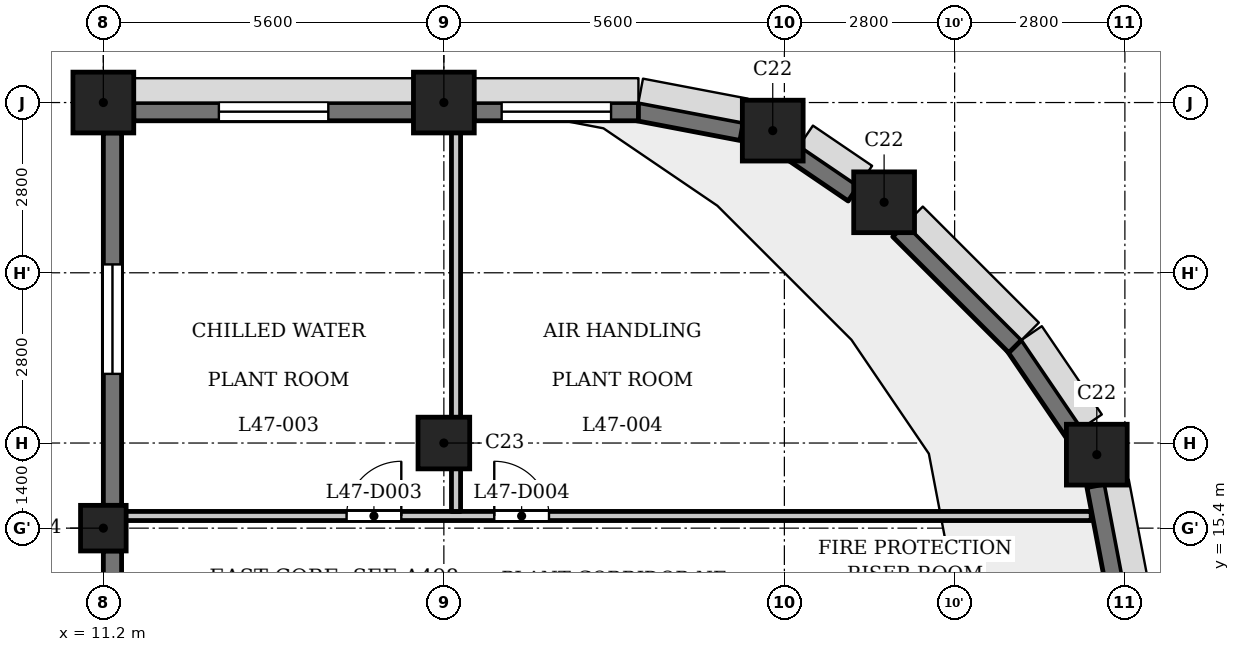
"""IFC4 building model, lengths in metres.
Left out: names, types, materials, properties, quantities, classifications, styles, units other than length and angle.
Written with IfcOpenShell. Run it as: python <this file> out.ifc"""

import sys

from ifc_helpers import new_model, si_unit, direction, frame, frame_2d, origin, origin_2d, place, context, subcontext, project, spatial, rectangle, extrude, element, fill, save


model = new_model("IFC4")
c1 = context("Model", 3, precision=1e-05, world=origin(), true_north=direction((0.0, 1.0)))
c2 = subcontext(c1, "Body", "Model", "MODEL_VIEW")
j1 = project(units=[si_unit("LENGTHUNIT", "METRE"), si_unit("PLANEANGLEUNIT", "RADIAN")], contexts=[c1])
p1 = place(None, origin())
s1 = spatial("IfcSite", under=j1, at=p1, CompositionType="ELEMENT")
p2 = place(p1, origin())
s2 = spatial("IfcBuilding", under=s1, at=p2, CompositionType="ELEMENT")
p3 = place(p2, frame((0.0, 0.0, 183.5)))
s3 = spatial("IfcBuildingStorey", under=s2, at=p3, CompositionType="ELEMENT", Elevation=183.5)
for number, where, z_axis, x_axis in (
    (1, (27.538, 16.609, 0.0), (0.0, 0.0, 1.0), (1.0, 0.0, 0.0)),
    (2, (24.04, 20.76, 0.0), (0.0, 0.0, 1.0), (1.0, 0.0, 0.0)),
    (3, (22.209, 21.938, 0.0), (0.0, 0.0, 1.0), (1.0, 0.0, 0.0)),
    (4, (16.8, 22.4, 0.0), (0.0, 0.0, 1.0), (1.0, 0.0, 0.0)),
    (5, (11.2, 22.4, 0.0), (0.0, 0.0, 1.0), (1.0, 0.0, 0.0)),
):
    element("IfcColumn", number, at=place(p3, frame(where, z_axis=z_axis, x_axis=x_axis)), inside=s3, PredefinedType="COLUMN", context=c2, shape_type="SweptSolid", body=[
        extrude(rectangle(XDim=1.0, YDim=1.0, at=origin_2d()), origin(), (0.0, 0.0, 1.0), 5.4),
    ])
p4 = place(p3, frame((16.8, 16.8, 0.0), z_axis=(0.0, 0.0, 1.0), x_axis=(1.0, 0.0, 0.0)))
e6 = element("IfcColumn", 6, at=p4, inside=s3, PredefinedType="COLUMN", context=c2, shape_type="SweptSolid", body=[
    extrude(rectangle(XDim=0.85, YDim=0.85, at=origin_2d()), origin(), (0.0, 0.0, 1.0), 5.4),
])
p5 = place(p3, frame((11.2, 15.4, 0.0), z_axis=(0.0, 0.0, 1.0), x_axis=(1.0, 0.0, 0.0)))
e7 = element("IfcColumn", 7, at=p5, inside=s3, PredefinedType="COLUMN", context=c2, shape_type="SweptSolid", body=[
    extrude(rectangle(XDim=0.75, YDim=0.75, at=origin_2d()), origin(), (0.0, 0.0, 1.0), 5.4),
])
for number, where, z_axis, x_axis in (
    (8, (27.853, 14.372, 0.0), (0.0, 0.0, 1.0), (-0.187, 0.982, 0.0)),
    (9, (27.166, 16.96, 0.0), (0.0, 0.0, 1.0), (-0.562, 0.827, 0.0)),
):
    element("IfcWall", number, at=place(p3, frame(where, z_axis=z_axis, x_axis=x_axis)), inside=s3, PredefinedType="SOLIDWALL", context=c2, shape_type="SweptSolid", body=[
        extrude(rectangle(XDim=1.756, YDim=0.3, at=frame_2d((0.878, 0.0))), origin(), (0.0, 0.0, 1.0), 2.6),
    ])
p6 = place(p3, frame((26.197, 18.391, 0.0), z_axis=(0.0, 0.0, 1.0), x_axis=(-0.707061571201, 0.707151988282, 0.0)))
e10 = element("IfcWall", 10, at=p6, inside=s3, PredefinedType="SOLIDWALL", context=c2, shape_type="SweptSolid", body=[
    extrude(rectangle(XDim=2.7, YDim=0.3, at=frame_2d((1.35, 0.0))), origin(), (0.0, 0.0, 1.0), 2.6),
])
p7 = place(p3, frame((23.534, 20.904, 0.0), z_axis=(0.0, 0.0, 1.0), x_axis=(-0.827103906596, 0.56204904385, 0.0)))
e11 = element("IfcWall", 11, at=p7, inside=s3, PredefinedType="SOLIDWALL", context=c2, shape_type="SweptSolid", body=[
    extrude(rectangle(XDim=1.177, YDim=0.3, at=frame_2d((0.589, 0.0))), origin(), (0.0, 0.0, 1.0), 4.6),
])
p8 = place(p3, frame((21.697, 21.924, 0.0), z_axis=(0.0, 0.0, 1.0), x_axis=(-0.982284988433, 0.187393173565, 0.0)))
e12 = element("IfcWall", 12, at=p8, inside=s3, PredefinedType="SOLIDWALL", context=c2, shape_type="SweptSolid", body=[
    extrude(rectangle(XDim=1.756, YDim=0.3, at=frame_2d((0.878, 0.0))), origin(), (0.0, 0.0, 1.0), 2.6),
])
p9 = place(p3, frame((20.0, 22.25, 0.0), z_axis=(0.0, 0.0, 1.0), x_axis=(-1.0, 0.0, 0.0)))
e13 = element("IfcWall", 13, at=p9, inside=s3, PredefinedType="SOLIDWALL", context=c2, shape_type="SweptSolid", body=[
    extrude(rectangle(XDim=2.7, YDim=0.3, at=frame_2d((1.35, 0.0))), origin(), (0.0, 0.0, 1.0), 2.6),
])
p10 = place(p9, frame((0.45, 0.0, 0.9)))
e14 = element("IfcOpeningElement", 14, at=p10, cuts=e13, PredefinedType="OPENING", context=c2, shape_type="SweptSolid", body=[
    extrude(rectangle(XDim=1.8, YDim=1.5, at=frame_2d((0.9, 0.75))), frame((0.0, 0.16, 0.0), z_axis=(0.0, -1.0, 0.0), x_axis=(1.0, 0.0, 0.0)), (0.0, 0.0, 1.0), 0.32),
])
p11 = place(p3, frame((16.3, 22.25, 0.0), z_axis=(0.0, 0.0, 1.0), x_axis=(-1.0, 0.0, 0.0)))
e15 = element("IfcWall", 15, at=p11, inside=s3, PredefinedType="SOLIDWALL", context=c2, shape_type="SweptSolid", body=[
    extrude(rectangle(XDim=4.6, YDim=0.3, at=frame_2d((2.3, 0.0))), origin(), (0.0, 0.0, 1.0), 2.6),
])
p12 = place(p11, frame((1.4, 0.0, 0.9)))
e16 = element("IfcOpeningElement", 16, at=p12, cuts=e15, PredefinedType="OPENING", context=c2, shape_type="SweptSolid", body=[
    extrude(rectangle(XDim=1.8, YDim=1.5, at=frame_2d((0.9, 0.75))), frame((0.0, 0.16, 0.0), z_axis=(0.0, -1.0, 0.0), x_axis=(1.0, 0.0, 0.0)), (0.0, 0.0, 1.0), 0.32),
])
p13 = place(p3, frame((11.35, 21.9, 0.0), z_axis=(0.0, 0.0, 1.0), x_axis=(0.0, -1.0, 0.0)))
e17 = element("IfcWall", 17, at=p13, inside=s3, PredefinedType="SOLIDWALL", context=c2, shape_type="SweptSolid", body=[
    extrude(rectangle(XDim=6.125, YDim=0.3, at=frame_2d((3.062, 0.0))), origin(), (0.0, 0.0, 1.0), 4.6),
])
p14 = place(p13, frame((2.163, 0.0, 0.9)))
e18 = element("IfcOpeningElement", 18, at=p14, cuts=e17, PredefinedType="OPENING", context=c2, shape_type="SweptSolid", body=[
    extrude(rectangle(XDim=1.8, YDim=1.5, at=frame_2d((0.9, 0.75))), frame((0.0, 0.16, 0.0), z_axis=(0.0, -1.0, 0.0), x_axis=(1.0, 0.0, 0.0)), (0.0, 0.0, 1.0), 0.32),
])
p15 = place(p3, frame((11.35, 15.025, 0.0), z_axis=(0.0, 0.0, 1.0), x_axis=(0.0, -1.0, 0.0)))
e19 = element("IfcWall", 19, at=p15, inside=s3, PredefinedType="SOLIDWALL", context=c2, shape_type="SweptSolid", body=[
    extrude(rectangle(XDim=6.2, YDim=0.3, at=frame_2d((3.1, 0.0))), origin(), (0.0, 0.0, 1.0), 4.6),
])
p16 = place(p15, frame((3.15, 0.0, 0.9)))
e20 = element("IfcOpeningElement", 20, at=p16, cuts=e19, PredefinedType="OPENING", context=c2, shape_type="SweptSolid", body=[
    extrude(rectangle(XDim=1.8, YDim=1.5, at=frame_2d((0.9, 0.75))), frame((0.0, 0.16, 0.0), z_axis=(0.0, -1.0, 0.0), x_axis=(1.0, 0.0, 0.0)), (0.0, 0.0, 1.0), 0.32),
])
p17 = place(p3, frame((11.29, 15.6, 0.0), z_axis=(0.0, 0.0, 1.0), x_axis=(1.0, 0.0, 0.0)))
e21 = element("IfcWall", 21, at=p17, inside=s3, PredefinedType="PARTITIONING", context=c2, shape_type="SweptSolid", body=[
    extrude(rectangle(XDim=16.156, YDim=0.15, at=frame_2d((8.078, 0.0))), origin(), (0.0, 0.0, 1.0), 4.6),
])
p18 = place(p17, frame((3.91, 0.0, 0.0)))
e22 = element("IfcOpeningElement", 22, at=p18, cuts=e21, PredefinedType="OPENING", context=c2, shape_type="SweptSolid", body=[
    extrude(rectangle(XDim=0.9, YDim=2.1, at=frame_2d((0.45, 1.05))), frame((0.0, 0.085, 0.0), z_axis=(0.0, -1.0, 0.0), x_axis=(1.0, 0.0, 0.0)), (0.0, 0.0, 1.0), 0.17),
])
p19 = place(p17, frame((6.339, 0.0, 0.0)))
e23 = element("IfcOpeningElement", 23, at=p19, cuts=e21, PredefinedType="OPENING", context=c2, shape_type="SweptSolid", body=[
    extrude(rectangle(XDim=0.9, YDim=2.1, at=frame_2d((0.45, 1.05))), frame((0.0, 0.085, 0.0), z_axis=(0.0, -1.0, 0.0), x_axis=(1.0, 0.0, 0.0)), (0.0, 0.0, 1.0), 0.17),
])
p20 = place(p3, frame((17.0, 15.675, 0.0), z_axis=(0.0, 0.0, 1.0), x_axis=(0.0, 1.0, 0.0)))
e24 = element("IfcWall", 24, at=p20, inside=s3, PredefinedType="PARTITIONING", context=c2, shape_type="SweptSolid", body=[
    extrude(rectangle(XDim=6.635, YDim=0.15, at=frame_2d((3.317, 0.0))), origin(), (0.0, 0.0, 1.0), 4.6),
])
p21 = place(p18, origin())
e25 = element("IfcDoor", 25, at=p21, inside=s3, OperationType="SINGLE_SWING_LEFT", PredefinedType="DOOR", context=c2, shape_type="SweptSolid", body=[
    extrude(rectangle(XDim=0.9, YDim=2.1, at=frame_2d((0.45, 1.05))), frame((0.0, 0.025, 0.0), z_axis=(0.0, -1.0, 0.0), x_axis=(1.0, 0.0, 0.0)), (0.0, 0.0, 1.0), 0.05),
])
fill(e22, e25)
p22 = place(p19, origin())
e26 = element("IfcDoor", 26, at=p22, inside=s3, OperationType="SINGLE_SWING_RIGHT", PredefinedType="DOOR", context=c2, shape_type="SweptSolid", body=[
    extrude(rectangle(XDim=0.9, YDim=2.1, at=frame_2d((0.45, 1.05))), frame((0.0, 0.025, 0.0), z_axis=(0.0, -1.0, 0.0), x_axis=(1.0, 0.0, 0.0)), (0.0, 0.0, 1.0), 0.05),
])
fill(e23, e26)
p23 = place(p10, origin())
e27 = element("IfcWindow", 27, at=p23, inside=s3, PartitioningType="SINGLE_PANEL", PredefinedType="WINDOW", context=c2, shape_type="SweptSolid", body=[
    extrude(rectangle(XDim=1.8, YDim=1.5, at=frame_2d((0.9, 0.75))), frame((0.0, 0.03, 0.0), z_axis=(0.0, -1.0, 0.0), x_axis=(1.0, 0.0, 0.0)), (0.0, 0.0, 1.0), 0.06),
])
fill(e14, e27)
p24 = place(p12, origin())
e28 = element("IfcWindow", 28, at=p24, inside=s3, PartitioningType="SINGLE_PANEL", PredefinedType="WINDOW", context=c2, shape_type="SweptSolid", body=[
    extrude(rectangle(XDim=1.8, YDim=1.5, at=frame_2d((0.9, 0.75))), frame((0.0, 0.03, 0.0), z_axis=(0.0, -1.0, 0.0), x_axis=(1.0, 0.0, 0.0)), (0.0, 0.0, 1.0), 0.06),
])
fill(e16, e28)
p25 = place(p14, origin())
e29 = element("IfcWindow", 29, at=p25, inside=s3, PartitioningType="SINGLE_PANEL", PredefinedType="WINDOW", context=c2, shape_type="SweptSolid", body=[
    extrude(rectangle(XDim=1.8, YDim=1.5, at=frame_2d((0.9, 0.75))), frame((0.0, 0.03, 0.0), z_axis=(0.0, -1.0, 0.0), x_axis=(1.0, 0.0, 0.0)), (0.0, 0.0, 1.0), 0.06),
])
fill(e18, e29)
save(model, sys.argv[1])
